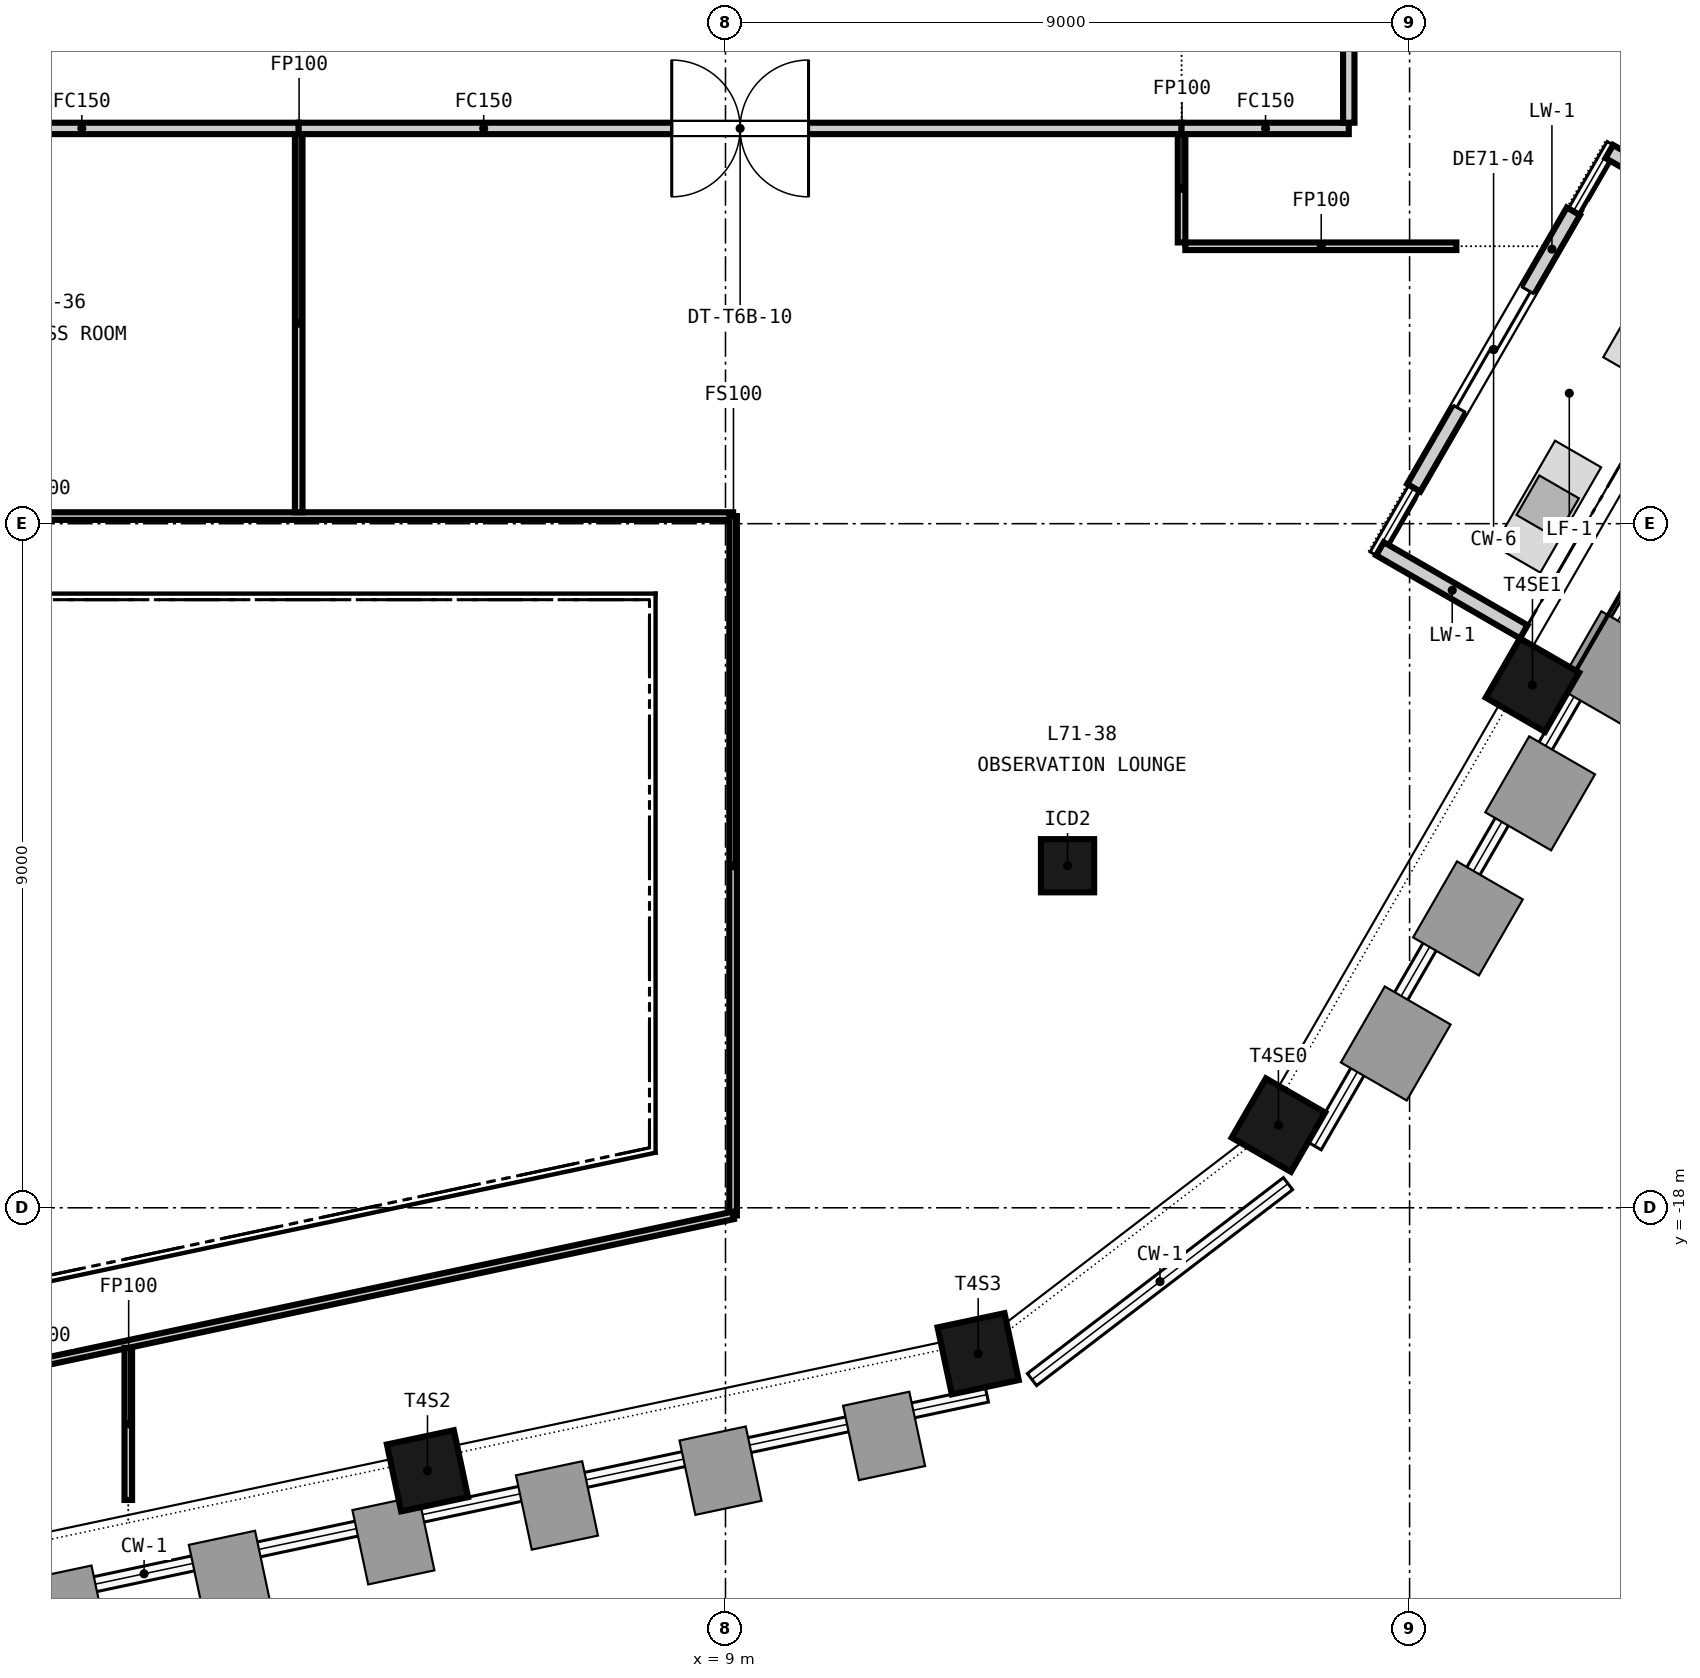
"""IFC4 building model, lengths in metres.
Left out: names, types, materials, properties, quantities, classifications, styles, units other than length and angle.
Written with IfcOpenShell. Run it as: python <this file> out.ifc"""

import sys

from ifc_helpers import new_model, si_unit, direction, frame, frame_2d, origin, origin_2d, place, context, subcontext, project, spatial, rectangle, extrude, element, fill, save


model = new_model("IFC4")
c1 = context("Model", 3, precision=1e-05, world=origin(), true_north=direction((0.0, 1.0)))
c2 = subcontext(c1, "Body", "Model", "MODEL_VIEW")
j1 = project(units=[si_unit("LENGTHUNIT", "METRE"), si_unit("PLANEANGLEUNIT", "RADIAN")], contexts=[c1])
p1 = place(None, origin())
s1 = spatial("IfcSite", under=j1, at=p1, CompositionType="ELEMENT")
p2 = place(p1, origin())
s2 = spatial("IfcBuilding", under=s1, at=p2, CompositionType="ELEMENT")
p3 = place(p2, frame((0.0, 0.0, 279.2)))
s3 = spatial("IfcBuildingStorey", under=s2, at=p3, CompositionType="ELEMENT", Elevation=279.2)
for number, where, z_axis, x_axis in (
    (1, (5.079, -21.46, -0.15), (0.0, 0.0, 1.0), (0.978, 0.208, 0.0)),
    (2, (12.324, -19.92, -0.15), (0.0, 0.0, 1.0), (0.978, 0.208, 0.0)),
    (3, (16.274, -16.912, -0.15), (0.0, 0.0, 1.0), (0.5, 0.866, 0.0)),
    (4, (19.616, -11.123, -0.15), (0.0, 0.0, 1.0), (0.5, 0.866, 0.0)),
):
    element("IfcColumn", number, at=place(p3, frame(where, z_axis=z_axis, x_axis=x_axis)), inside=s3, PredefinedType="COLUMN", context=c2, shape_type="SweptSolid", body=[
        extrude(rectangle(XDim=0.9, YDim=0.9, at=origin_2d()), origin(), (0.0, 0.0, 1.0), 3.65),
    ])
p4 = place(p3, frame((13.5, -13.5, -0.15), z_axis=(0.0, 0.0, 1.0), x_axis=(1.0, 0.0, 0.0)))
e5 = element("IfcColumn", 5, at=p4, inside=s3, PredefinedType="COLUMN", context=c2, shape_type="SweptSolid", body=[
    extrude(rectangle(XDim=0.7, YDim=0.7, at=origin_2d()), origin(), (0.0, 0.0, 1.0), 3.65),
])
p5 = place(p3, frame((18.055, -8.528, 0.0), z_axis=(0.0, 0.0, 1.0), x_axis=(0.49998411664, 0.866034573852, 0.0)))
e6 = element("IfcWall", 6, at=p5, inside=s3, PredefinedType="SOLIDWALL", context=c2, shape_type="SweptSolid", body=[
    extrude(rectangle(XDim=4.2, YDim=0.2, at=frame_2d((2.1, 0.0))), origin(), (0.0, 0.0, 1.0), 2.9),
])
p6 = place(p5, frame((1.2, 0.0, 0.0)))
e7 = element("IfcOpeningElement", 7, at=p6, cuts=e6, PredefinedType="OPENING", context=c2, shape_type="SweptSolid", body=[
    extrude(rectangle(XDim=1.8, YDim=2.4, at=frame_2d((0.9, 1.2))), frame((0.0, 0.11, 0.0), z_axis=(0.0, -1.0, 0.0), x_axis=(1.0, 0.0, 0.0)), (0.0, 0.0, 1.0), 0.22),
])
for number, where, z_axis, x_axis in (
    (8, (19.502, -10.422, 0.0), (0.0, 0.0, 1.0), (-0.866, 0.5, 0.0)),
    (9, (22.519, -5.196, 0.0), (0.0, 0.0, 1.0), (-0.866, 0.5, 0.0)),
):
    element("IfcWall", number, at=place(p3, frame(where, z_axis=z_axis, x_axis=x_axis)), inside=s3, PredefinedType="SOLIDWALL", context=c2, shape_type="SweptSolid", body=[
        extrude(rectangle(XDim=2.184, YDim=0.2, at=frame_2d((1.092, 0.0))), origin(), (0.0, 0.0, 1.0), 3.05),
    ])
p7 = place(p3, frame((3.385, -3.8, 0.0), z_axis=(0.0, 0.0, 1.0), x_axis=(-1.0, 0.0, 0.0)))
e10 = element("IfcWall", 10, at=p7, inside=s3, PredefinedType="PARTITIONING", context=c2, shape_type="SweptSolid", body=[
    extrude(rectangle(XDim=12.533, YDim=0.15, at=frame_2d((6.267, 0.0))), origin(), (0.0, 0.0, 1.0), 2.751),
])
p8 = place(p7, frame((5.767, 0.0, 0.0)))
e11 = element("IfcOpeningElement", 11, at=p8, cuts=e10, PredefinedType="OPENING", context=c2, shape_type="SweptSolid", body=[
    extrude(rectangle(XDim=1.0, YDim=2.1, at=frame_2d((0.5, 1.05))), frame((0.0, 0.085, 0.0), z_axis=(0.0, -1.0, 0.0), x_axis=(1.0, 0.0, 0.0)), (0.0, 0.0, 1.0), 0.17),
])
p9 = place(p3, frame((15.0, -3.8, 0.0), z_axis=(0.0, 0.0, 1.0), x_axis=(-1.0, 0.0, 0.0)))
e12 = element("IfcWall", 12, at=p9, inside=s3, PredefinedType="PARTITIONING", context=c2, shape_type="SweptSolid", body=[
    extrude(rectangle(XDim=11.615, YDim=0.15, at=frame_2d((5.808, 0.0))), origin(), (0.0, 0.0, 1.0), 2.751),
])
p10 = place(p9, frame((4.907, 0.0, 0.0)))
e13 = element("IfcOpeningElement", 13, at=p10, cuts=e12, PredefinedType="OPENING", context=c2, shape_type="SweptSolid", body=[
    extrude(rectangle(XDim=1.8, YDim=2.1, at=frame_2d((0.9, 1.05))), frame((0.0, 0.085, 0.0), z_axis=(0.0, -1.0, 0.0), x_axis=(1.0, 0.0, 0.0)), (0.0, 0.0, 1.0), 0.17),
])
p11 = place(p3, frame((17.2, -3.8, 0.0), z_axis=(0.0, 0.0, 1.0), x_axis=(-1.0, 0.0, 0.0)))
e14 = element("IfcWall", 14, at=p11, inside=s3, PredefinedType="PARTITIONING", context=c2, shape_type="SweptSolid", body=[
    extrude(rectangle(XDim=2.2, YDim=0.15, at=frame_2d((1.1, 0.0))), origin(), (0.0, 0.0, 1.0), 2.751),
])
p12 = place(p3, frame((17.2, 6.235, 0.0), z_axis=(0.0, 0.0, 1.0), x_axis=(0.0, -1.0, 0.0)))
e15 = element("IfcWall", 15, at=p12, inside=s3, PredefinedType="PARTITIONING", context=c2, shape_type="SweptSolid", body=[
    extrude(rectangle(XDim=9.96, YDim=0.15, at=frame_2d((4.98, 0.0))), origin(), (0.0, 0.0, 1.0), 2.751),
])
p13 = place(p12, frame((4.48, 0.0, 0.0)))
e16 = element("IfcOpeningElement", 16, at=p13, cuts=e15, PredefinedType="OPENING", context=c2, shape_type="SweptSolid", body=[
    extrude(rectangle(XDim=1.0, YDim=2.1, at=frame_2d((0.5, 1.05))), frame((0.0, 0.085, 0.0), z_axis=(0.0, -1.0, 0.0), x_axis=(1.0, 0.0, 0.0)), (0.0, 0.0, 1.0), 0.17),
])
p14 = place(p3, frame((15.05, -5.35, 0.0), z_axis=(0.0, 0.0, 1.0), x_axis=(1.0, 0.0, 0.0)))
e17 = element("IfcWall", 17, at=p14, inside=s3, PredefinedType="PARTITIONING", context=c2, shape_type="SweptSolid", body=[
    extrude(rectangle(XDim=3.565, YDim=0.1, at=frame_2d((1.783, 0.0))), origin(), (0.0, 0.0, 1.0), 2.751),
])
p15 = place(p3, frame((3.385, -8.85, 0.0), z_axis=(0.0, 0.0, 1.0), x_axis=(0.0, 1.0, 0.0)))
e18 = element("IfcWall", 18, at=p15, inside=s3, PredefinedType="PARTITIONING", context=c2, shape_type="SweptSolid", body=[
    extrude(rectangle(XDim=4.975, YDim=0.1, at=frame_2d((2.488, 0.0))), origin(), (0.0, 0.0, 1.0), 2.751),
])
p16 = place(p3, frame((1.143, -21.844, 0.0), z_axis=(0.0, 0.0, 1.0), x_axis=(0.0, 1.0, 0.0)))
e19 = element("IfcWall", 19, at=p16, inside=s3, PredefinedType="PARTITIONING", context=c2, shape_type="SweptSolid", body=[
    extrude(rectangle(XDim=2.001, YDim=0.1, at=frame_2d((1.0, 0.0))), origin(), (0.0, 0.0, 1.0), 2.751),
])
p17 = place(p3, frame((15.0, -5.3, 0.0), z_axis=(0.0, 0.0, 1.0), x_axis=(0.0, 1.0, 0.0)))
e20 = element("IfcWall", 20, at=p17, inside=s3, PredefinedType="PARTITIONING", context=c2, shape_type="SweptSolid", body=[
    extrude(rectangle(XDim=1.425, YDim=0.1, at=frame_2d((0.712, 0.0))), origin(), (0.0, 0.0, 1.0), 2.751),
])
p18 = place(p3, frame((-9.1, -8.9, 0.0), z_axis=(0.0, 0.0, 1.0), x_axis=(1.0, 0.0, 0.0)))
e21 = element("IfcWall", 21, at=p18, inside=s3, PredefinedType="PARTITIONING", context=c2, shape_type="SweptSolid", body=[
    extrude(rectangle(XDim=18.2, YDim=0.1, at=frame_2d((9.1, 0.0))), origin(), (0.0, 0.0, 1.0), 2.751),
])
p19 = place(p3, frame((9.1, -8.9, 0.0), z_axis=(0.0, 0.0, 1.0), x_axis=(0.0, -1.0, 0.0)))
e22 = element("IfcWall", 22, at=p19, inside=s3, PredefinedType="PARTITIONING", context=c2, shape_type="SweptSolid", body=[
    extrude(rectangle(XDim=9.201, YDim=0.1, at=frame_2d((4.601, 0.0))), origin(), (0.0, 0.0, 1.0), 2.751),
])
p20 = place(p3, frame((9.1, -18.101, 0.0), z_axis=(0.0, 0.0, 1.0), x_axis=(-0.978146710971, -0.207915876778, 0.0)))
e23 = element("IfcWall", 23, at=p20, inside=s3, PredefinedType="PARTITIONING", context=c2, shape_type="SweptSolid", body=[
    extrude(rectangle(XDim=18.607, YDim=0.1, at=frame_2d((9.303, 0.0))), origin(), (0.0, 0.0, 1.0), 2.751),
])
p21 = place(p6, origin())
e24 = element("IfcDoor", 24, at=p21, inside=s3, OperationType="SINGLE_SWING_LEFT", PredefinedType="DOOR", context=c2, shape_type="SweptSolid", body=[
    extrude(rectangle(XDim=1.8, YDim=2.4, at=frame_2d((0.9, 1.2))), frame((0.0, 0.025, 0.0), z_axis=(0.0, -1.0, 0.0), x_axis=(1.0, 0.0, 0.0)), (0.0, 0.0, 1.0), 0.05),
])
fill(e7, e24)
p22 = place(p10, origin())
e25 = element("IfcDoor", 25, at=p22, inside=s3, OperationType="DOUBLE_DOOR_DOUBLE_SWING", PredefinedType="DOOR", context=c2, shape_type="SweptSolid", body=[
    extrude(rectangle(XDim=1.8, YDim=2.1, at=frame_2d((0.9, 1.05))), frame((0.0, 0.025, 0.0), z_axis=(0.0, -1.0, 0.0), x_axis=(1.0, 0.0, 0.0)), (0.0, 0.0, 1.0), 0.05),
])
fill(e13, e25)
save(model, sys.argv[1])
